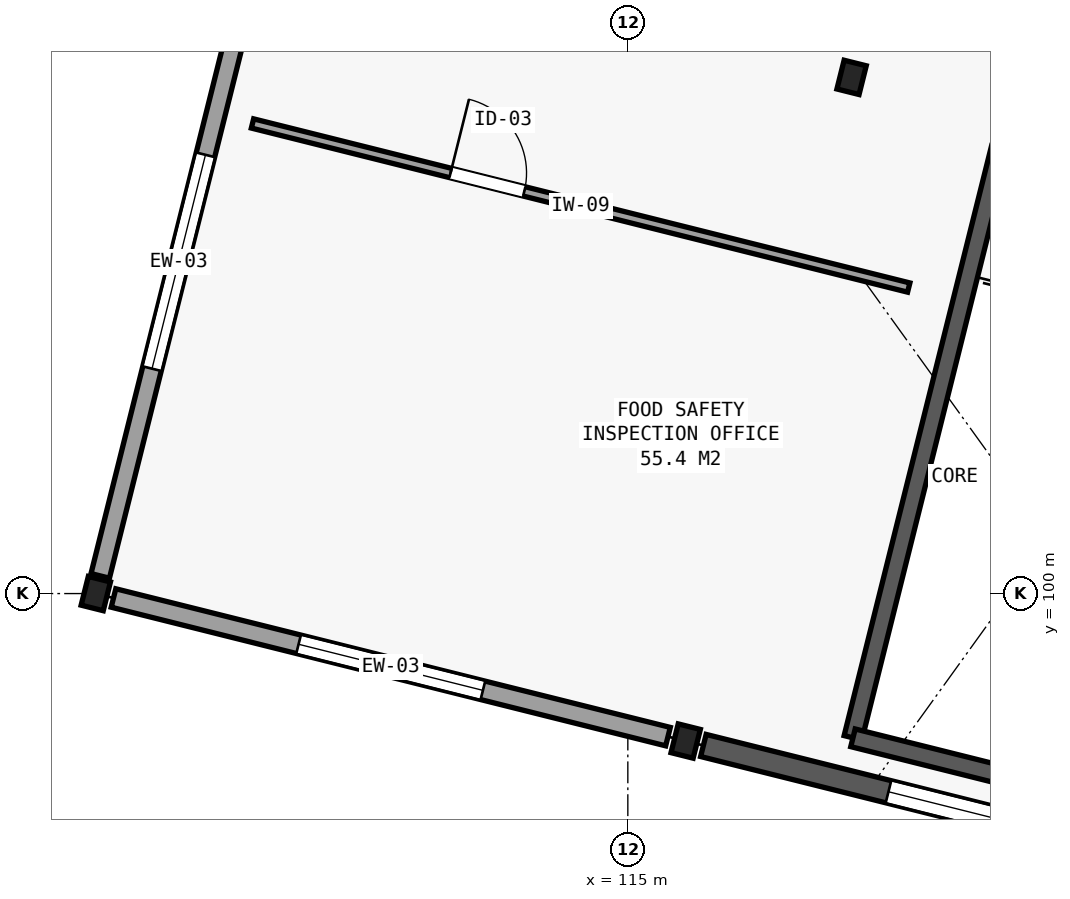
"""IFC4 building model, lengths in metres.
Left out: names, types, materials, properties, quantities, classifications, styles, units other than length and angle.
Written with IfcOpenShell. Run it as: python <this file> out.ifc"""

import sys

from ifc_helpers import new_model, si_unit, direction, frame, frame_2d, origin, origin_2d, place, context, subcontext, project, spatial, rectangle, i_section, extrude, element, fill, save


model = new_model("IFC4")
c1 = context("Model", 3, precision=1e-05, world=origin(), true_north=direction((0.0, 1.0)))
c2 = subcontext(c1, "Body", "Model", "MODEL_VIEW")
j1 = project(units=[si_unit("LENGTHUNIT", "METRE"), si_unit("PLANEANGLEUNIT", "RADIAN")], contexts=[c1])
p1 = place(None, origin())
s1 = spatial("IfcSite", under=j1, at=p1, CompositionType="ELEMENT")
p2 = place(p1, origin())
s2 = spatial("IfcBuilding", under=s1, at=p2, CompositionType="ELEMENT")
p3 = place(p2, frame((0.0, 0.0, 14.1)))
s3 = spatial("IfcBuildingStorey", under=s2, at=p3, CompositionType="ELEMENT", Elevation=14.1)
for number, where, z_axis, x_axis in (
    (1, (108.0, 100.0, 0.0), (0.0, 0.0, 1.0), (0.97, -0.243, 0.0)),
    (2, (115.761, 98.06, 0.0), (0.0, 0.0, 1.0), (0.97, -0.243, 0.0)),
    (3, (117.944, 106.791, 0.0), (0.0, 0.0, 1.0), (0.97, -0.243, 0.0)),
):
    element("IfcColumn", number, at=place(p3, frame(where, z_axis=z_axis, x_axis=x_axis)), inside=s3, PredefinedType="COLUMN", context=c2, shape_type="SweptSolid", body=[
        extrude(i_section(OverallWidth=0.3, OverallDepth=0.39, WebThickness=0.011, FlangeThickness=0.019, FilletRadius=0.027, at=origin_2d()), origin(), (0.0, 0.0, 1.0), 4.2),
    ])
p4 = place(p3, frame((115.528, 98.118, 0.0), z_axis=(0.0, 0.0, 1.0), x_axis=(-0.970138680536, 0.242550902961, 0.0)))
e4 = element("IfcWall", 4, at=p4, inside=s3, PredefinedType="SOLIDWALL", context=c2, shape_type="SweptSolid", body=[
    extrude(rectangle(XDim=7.52, YDim=0.25, at=frame_2d((3.76, 0.0))), origin(), (0.0, 0.0, 1.0), 3.61),
])
p5 = place(p4, frame((2.51, 0.0, 1.05)))
e5 = element("IfcOpeningElement", 5, at=p5, cuts=e4, PredefinedType="OPENING", context=c2, shape_type="SweptSolid", body=[
    extrude(rectangle(XDim=2.5, YDim=1.65, at=frame_2d((1.25, 0.825))), frame((0.0, 0.135, 0.0), z_axis=(0.0, -1.0, 0.0), x_axis=(1.0, 0.0, 0.0)), (0.0, 0.0, 1.0), 0.27),
])
p6 = place(p3, frame((123.29, 96.178, 0.0), z_axis=(0.0, 0.0, 1.0), x_axis=(-0.970148228972, 0.242512708578, 0.0)))
e6 = element("IfcWall", 6, at=p6, inside=s3, PredefinedType="SHEAR", context=c2, shape_type="SweptSolid", body=[
    extrude(rectangle(XDim=7.52, YDim=0.3, at=frame_2d((3.76, 0.0))), origin(), (0.0, 0.0, 1.0), 3.96),
])
p7 = place(p6, frame((2.51, 0.0, 1.05)))
e7 = element("IfcOpeningElement", 7, at=p7, cuts=e6, PredefinedType="OPENING", context=c2, shape_type="SweptSolid", body=[
    extrude(rectangle(XDim=2.5, YDim=1.65, at=frame_2d((1.25, 0.825))), frame((0.0, 0.16, 0.0), z_axis=(0.0, -1.0, 0.0), x_axis=(1.0, 0.0, 0.0)), (0.0, 0.0, 1.0), 0.32),
])
p8 = place(p3, frame((108.058, 100.233, 0.0), z_axis=(0.0, 0.0, 1.0), x_axis=(0.242535625036, 0.970142500145, 0.0)))
e8 = element("IfcWall", 8, at=p8, inside=s3, PredefinedType="SOLIDWALL", context=c2, shape_type="SweptSolid", body=[
    extrude(rectangle(XDim=8.52, YDim=0.25, at=frame_2d((4.26, 0.0))), origin(), (0.0, 0.0, 1.0), 3.61),
])
p9 = place(p8, frame((2.81, 0.0, 1.05)))
e9 = element("IfcOpeningElement", 9, at=p9, cuts=e8, PredefinedType="OPENING", context=c2, shape_type="SweptSolid", body=[
    extrude(rectangle(XDim=2.9, YDim=1.95, at=frame_2d((1.45, 0.975))), frame((0.0, 0.135, 0.0), z_axis=(0.0, -1.0, 0.0), x_axis=(1.0, 0.0, 0.0)), (0.0, 0.0, 1.0), 0.27),
])
p10 = place(p3, frame((117.962, 98.102, 0.0), z_axis=(0.0, 0.0, 1.0), x_axis=(0.242528444268, 0.970144295309, 0.0)))
e10 = element("IfcWall", 10, at=p10, inside=s3, PredefinedType="SOLIDWALL", context=c2, shape_type="SweptSolid", body=[
    extrude(rectangle(XDim=8.0, YDim=0.24, at=frame_2d((4.0, 0.0))), origin(), (0.0, 0.0, 1.0), 3.96),
])
p11 = place(p3, frame((121.6, 97.193, 0.0), z_axis=(0.0, 0.0, 1.0), x_axis=(-0.970131009923, 0.242581581301, 0.0)))
e11 = element("IfcWall", 11, at=p11, inside=s3, PredefinedType="SOLIDWALL", context=c2, shape_type="SweptSolid", body=[
    extrude(rectangle(XDim=3.75, YDim=0.24, at=frame_2d((1.875, 0.0))), origin(), (0.0, 0.0, 1.0), 3.96),
])
p12 = place(p3, frame((111.449, 111.734, 0.0), z_axis=(0.0, 0.0, 1.0), x_axis=(0.970142500145, -0.242535625036, 0.0)))
e12 = element("IfcWall", 12, at=p12, inside=s3, PredefinedType="SHEAR", context=c2, shape_type="SweptSolid", body=[
    extrude(rectangle(XDim=23.1, YDim=0.265, at=frame_2d((11.55, 0.0))), origin(), (0.0, 0.0, 1.0), 3.96),
])
p13 = place(p12, frame((10.575, 0.0, 0.0)))
e13 = element("IfcOpeningElement", 13, at=p13, cuts=e12, PredefinedType="OPENING", context=c2, shape_type="SweptSolid", body=[
    extrude(rectangle(XDim=1.95, YDim=2.3, at=frame_2d((0.975, 1.15))), frame((0.0, 0.142, 0.0), z_axis=(0.0, -1.0, 0.0), x_axis=(1.0, 0.0, 0.0)), (0.0, 0.0, 1.0), 0.285),
])
p14 = place(p3, frame((110.062, 106.185, 0.0), z_axis=(0.0, 0.0, 1.0), x_axis=(0.970145727306, -0.24252271603, 0.0)))
e14 = element("IfcWall", 14, at=p14, inside=s3, PredefinedType="PARTITIONING", context=c2, shape_type="SweptSolid", body=[
    extrude(rectangle(XDim=8.9, YDim=0.125, at=frame_2d((4.45, 0.0))), origin(), (0.0, 0.0, 1.0), 3.61),
])
p15 = place(p14, frame((2.686, 0.0, 0.0)))
e15 = element("IfcOpeningElement", 15, at=p15, cuts=e14, PredefinedType="OPENING", context=c2, shape_type="SweptSolid", body=[
    extrude(rectangle(XDim=1.0, YDim=2.15, at=frame_2d((0.5, 1.075))), frame((0.0, 0.073, 0.0), z_axis=(0.0, -1.0, 0.0), x_axis=(1.0, 0.0, 0.0)), (0.0, 0.0, 1.0), 0.145),
])
p16 = place(p5, origin())
e16 = element("IfcWindow", 16, at=p16, inside=s3, PartitioningType="SINGLE_PANEL", PredefinedType="WINDOW", context=c2, shape_type="SweptSolid", body=[
    extrude(rectangle(XDim=2.5, YDim=1.65, at=frame_2d((1.25, 0.825))), frame((0.0, 0.03, 0.0), z_axis=(0.0, -1.0, 0.0), x_axis=(1.0, 0.0, 0.0)), (0.0, 0.0, 1.0), 0.06),
])
fill(e5, e16)
p17 = place(p7, origin())
e17 = element("IfcWindow", 17, at=p17, inside=s3, PartitioningType="SINGLE_PANEL", PredefinedType="WINDOW", context=c2, shape_type="SweptSolid", body=[
    extrude(rectangle(XDim=2.5, YDim=1.65, at=frame_2d((1.25, 0.825))), frame((0.0, 0.03, 0.0), z_axis=(0.0, -1.0, 0.0), x_axis=(1.0, 0.0, 0.0)), (0.0, 0.0, 1.0), 0.06),
])
fill(e7, e17)
p18 = place(p9, origin())
e18 = element("IfcWindow", 18, at=p18, inside=s3, PartitioningType="SINGLE_PANEL", PredefinedType="WINDOW", context=c2, shape_type="SweptSolid", body=[
    extrude(rectangle(XDim=2.9, YDim=1.95, at=frame_2d((1.45, 0.975))), frame((0.0, 0.03, 0.0), z_axis=(0.0, -1.0, 0.0), x_axis=(1.0, 0.0, 0.0)), (0.0, 0.0, 1.0), 0.06),
])
fill(e9, e18)
p19 = place(p15, origin())
e19 = element("IfcDoor", 19, at=p19, inside=s3, OperationType="SINGLE_SWING_LEFT", PredefinedType="DOOR", context=c2, shape_type="SweptSolid", body=[
    extrude(rectangle(XDim=1.0, YDim=2.15, at=frame_2d((0.5, 1.075))), frame((0.0, 0.025, 0.0), z_axis=(0.0, -1.0, 0.0), x_axis=(1.0, 0.0, 0.0)), (0.0, 0.0, 1.0), 0.05),
])
fill(e15, e19)
save(model, sys.argv[1])
